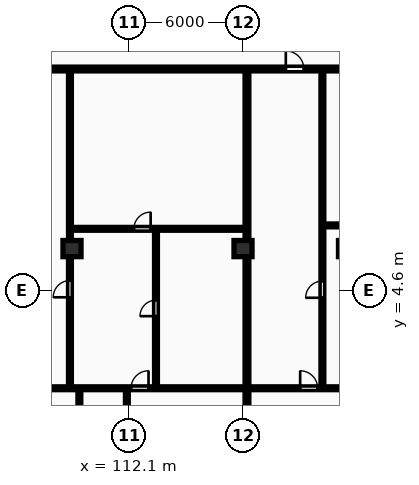
"""IFC4 building model, lengths in metres.
Left out: names, types, materials, properties, quantities, classifications, styles, units other than length and angle.
Written with IfcOpenShell. Run it as: python <this file> out.ifc"""

import sys

from ifc_helpers import new_model, si_unit, direction, frame, frame_2d, origin, origin_2d, place, context, subcontext, project, spatial, rectangle, extrude, element, fill, save


model = new_model("IFC4")
c1 = context("Model", 3, precision=1e-05, world=origin(), true_north=direction((0.0, 1.0)))
c2 = subcontext(c1, "Body", "Model", "MODEL_VIEW")
j1 = project(units=[si_unit("LENGTHUNIT", "METRE"), si_unit("PLANEANGLEUNIT", "RADIAN")], contexts=[c1])
p1 = place(None, origin())
s1 = spatial("IfcSite", under=j1, at=p1, CompositionType="ELEMENT")
p2 = place(p1, origin())
s2 = spatial("IfcBuilding", under=s1, at=p2, CompositionType="ELEMENT")
p3 = place(p2, frame((0.0, 0.0, 24.0)))
s3 = spatial("IfcBuildingStorey", under=s2, at=p3, CompositionType="ELEMENT", Elevation=24.0)
for number, where, z_axis, x_axis in (
    (1, (109.1, 6.8, 0.0), (0.0, 0.0, 1.0), (1.0, 0.0, 0.0)),
    (2, (118.1, 6.8, 0.0), (0.0, 0.0, 1.0), (1.0, 0.0, 0.0)),
    (3, (123.6, 6.8, 0.0), (0.0, 0.0, 1.0), (1.0, 0.0, 0.0)),
):
    element("IfcColumn", number, at=place(p3, frame(where, z_axis=z_axis, x_axis=x_axis)), inside=s3, PredefinedType="COLUMN", context=c2, shape_type="SweptSolid", body=[
        extrude(rectangle(XDim=0.95, YDim=0.85, at=origin_2d()), origin(), (0.0, 0.0, 1.0), 3.25),
    ])
p4 = place(p3, frame((118.307, -10.9, 0.0), z_axis=(0.0, 0.0, 1.0), x_axis=(0.0, 1.0, 0.0)))
e4 = element("IfcWall", 4, at=p4, inside=s3, PredefinedType="PARTITIONING", context=c2, shape_type="SweptSolid", body=[
    extrude(rectangle(XDim=27.07, YDim=0.2, at=frame_2d((13.535, 0.0))), origin(), (0.0, 0.0, 1.0), 2.22),
])
p5 = place(p3, frame((113.519, -0.51, 0.0), z_axis=(0.0, 0.0, 1.0), x_axis=(0.0, 1.0, 0.0)))
e5 = element("IfcWall", 5, at=p5, inside=s3, PredefinedType="PARTITIONING", context=c2, shape_type="SweptSolid", body=[
    extrude(rectangle(XDim=8.35, YDim=0.15, at=frame_2d((4.175, 0.0))), origin(), (0.0, 0.0, 1.0), 2.97),
])
p6 = place(p5, frame((3.755, 0.0, 0.0)))
e6 = element("IfcOpeningElement", 6, at=p6, cuts=e5, PredefinedType="OPENING", context=c2, shape_type="SweptSolid", body=[
    extrude(rectangle(XDim=0.84, YDim=2.04, at=frame_2d((0.42, 1.02))), frame((0.0, 0.085, 0.0), z_axis=(0.0, -1.0, 0.0), x_axis=(1.0, 0.0, 0.0)), (0.0, 0.0, 1.0), 0.17),
])
p7 = place(p3, frame((109.052, 7.84, 0.0), z_axis=(0.0, 0.0, 1.0), x_axis=(1.0, 0.0, 0.0)))
e7 = element("IfcWall", 7, at=p7, inside=s3, PredefinedType="PARTITIONING", context=c2, shape_type="SweptSolid", body=[
    extrude(rectangle(XDim=9.176, YDim=0.15, at=frame_2d((4.588, 0.0))), origin(), (0.0, 0.0, 1.0), 2.97),
])
p8 = place(p7, frame((3.307, 0.0, 0.0)))
e8 = element("IfcOpeningElement", 8, at=p8, cuts=e7, PredefinedType="OPENING", context=c2, shape_type="SweptSolid", body=[
    extrude(rectangle(XDim=0.88, YDim=2.06, at=frame_2d((0.44, 1.03))), frame((0.0, 0.085, 0.0), z_axis=(0.0, -1.0, 0.0), x_axis=(1.0, 0.0, 0.0)), (0.0, 0.0, 1.0), 0.17),
])
p9 = place(p3, frame((108.991, -0.51, 0.0), z_axis=(0.0, 0.0, 1.0), x_axis=(0.0, 1.0, 0.0)))
e9 = element("IfcWall", 9, at=p9, inside=s3, PredefinedType="PARTITIONING", context=c2, shape_type="SweptSolid", body=[
    extrude(rectangle(XDim=16.7, YDim=0.15, at=frame_2d((8.35, 0.0))), origin(), (0.0, 0.0, 1.0), 2.22),
])
p10 = place(p9, frame((4.747, 0.0, 0.0)))
e10 = element("IfcOpeningElement", 10, at=p10, cuts=e9, PredefinedType="OPENING", context=c2, shape_type="SweptSolid", body=[
    extrude(rectangle(XDim=0.88, YDim=2.06, at=frame_2d((0.44, 1.03))), frame((0.0, 0.085, 0.0), z_axis=(0.0, -1.0, 0.0), x_axis=(1.0, 0.0, 0.0)), (0.0, 0.0, 1.0), 0.17),
])
p11 = place(p3, frame((109.487, -5.59, 0.0), z_axis=(0.0, 0.0, 1.0), x_axis=(0.0, 1.0, 0.0)))
e11 = element("IfcWall", 11, at=p11, inside=s3, PredefinedType="PARTITIONING", context=c2, shape_type="SweptSolid", body=[
    extrude(rectangle(XDim=5.0, YDim=0.15, at=frame_2d((2.5, 0.0))), origin(), (0.0, 0.0, 1.0), 2.22),
])
p12 = place(p11, frame((3.049, 0.0, 0.0)))
e12 = element("IfcOpeningElement", 12, at=p12, cuts=e11, PredefinedType="OPENING", context=c2, shape_type="SweptSolid", body=[
    extrude(rectangle(XDim=0.84, YDim=2.04, at=frame_2d((0.42, 1.02))), frame((0.0, 0.085, 0.0), z_axis=(0.0, -1.0, 0.0), x_axis=(1.0, 0.0, 0.0)), (0.0, 0.0, 1.0), 0.17),
])
p13 = place(p3, frame((111.987, -5.59, 0.0), z_axis=(0.0, 0.0, 1.0), x_axis=(0.0, 1.0, 0.0)))
e13 = element("IfcWall", 13, at=p13, inside=s3, PredefinedType="PARTITIONING", context=c2, shape_type="SweptSolid", body=[
    extrude(rectangle(XDim=5.0, YDim=0.15, at=frame_2d((2.5, 0.0))), origin(), (0.0, 0.0, 1.0), 2.97),
])
p14 = place(p13, frame((2.08, 0.0, 0.0)))
e14 = element("IfcOpeningElement", 14, at=p14, cuts=e13, PredefinedType="OPENING", context=c2, shape_type="SweptSolid", body=[
    extrude(rectangle(XDim=0.84, YDim=2.04, at=frame_2d((0.42, 1.02))), frame((0.0, 0.085, 0.0), z_axis=(0.0, -1.0, 0.0), x_axis=(1.0, 0.0, 0.0)), (0.0, 0.0, 1.0), 0.17),
])
p15 = place(p3, frame((105.101, -0.55, 0.0), z_axis=(0.0, 0.0, 1.0), x_axis=(1.0, 0.0, 0.0)))
e15 = element("IfcWall", 15, at=p15, inside=s3, PredefinedType="PARTITIONING", context=c2, shape_type="SweptSolid", body=[
    extrude(rectangle(XDim=13.126, YDim=0.15, at=frame_2d((6.563, 0.0))), origin(), (0.0, 0.0, 1.0), 2.97),
])
p16 = place(p15, frame((7.106, 0.0, 0.0)))
e16 = element("IfcOpeningElement", 16, at=p16, cuts=e15, PredefinedType="OPENING", context=c2, shape_type="SweptSolid", body=[
    extrude(rectangle(XDim=0.92, YDim=2.08, at=frame_2d((0.46, 1.04))), frame((0.0, 0.085, 0.0), z_axis=(0.0, -1.0, 0.0), x_axis=(1.0, 0.0, 0.0)), (0.0, 0.0, 1.0), 0.17),
])
p17 = place(p3, frame((122.337, 8.02, 0.0), z_axis=(0.0, 0.0, 1.0), x_axis=(1.0, 0.0, 0.0)))
e17 = element("IfcWall", 17, at=p17, inside=s3, PredefinedType="PARTITIONING", context=c2, shape_type="SweptSolid", body=[
    extrude(rectangle(XDim=10.283, YDim=0.15, at=frame_2d((5.142, 0.0))), origin(), (0.0, 0.0, 1.0), 2.97),
])
p18 = place(p17, frame((3.99, 0.0, 0.0)))
e18 = element("IfcOpeningElement", 18, at=p18, cuts=e17, PredefinedType="OPENING", context=c2, shape_type="SweptSolid", body=[
    extrude(rectangle(XDim=0.88, YDim=2.06, at=frame_2d((0.44, 1.03))), frame((0.0, 0.085, 0.0), z_axis=(0.0, -1.0, 0.0), x_axis=(1.0, 0.0, 0.0)), (0.0, 0.0, 1.0), 0.17),
])
p19 = place(p3, frame((122.277, -0.51, 0.0), z_axis=(0.0, 0.0, 1.0), x_axis=(0.0, 1.0, 0.0)))
e19 = element("IfcWall", 19, at=p19, inside=s3, PredefinedType="PARTITIONING", context=c2, shape_type="SweptSolid", body=[
    extrude(rectangle(XDim=16.7, YDim=0.15, at=frame_2d((8.35, 0.0))), origin(), (0.0, 0.0, 1.0), 2.97),
])
p20 = place(p19, frame((4.721, 0.0, 0.0)))
e20 = element("IfcOpeningElement", 20, at=p20, cuts=e19, PredefinedType="OPENING", context=c2, shape_type="SweptSolid", body=[
    extrude(rectangle(XDim=0.88, YDim=2.06, at=frame_2d((0.44, 1.03))), frame((0.0, 0.085, 0.0), z_axis=(0.0, -1.0, 0.0), x_axis=(1.0, 0.0, 0.0)), (0.0, 0.0, 1.0), 0.17),
])
p21 = place(p3, frame((118.387, -0.55, 0.0), z_axis=(0.0, 0.0, 1.0), x_axis=(1.0, 0.0, 0.0)))
e21 = element("IfcWall", 21, at=p21, inside=s3, PredefinedType="PARTITIONING", context=c2, shape_type="SweptSolid", body=[
    extrude(rectangle(XDim=14.233, YDim=0.15, at=frame_2d((7.116, 0.0))), origin(), (0.0, 0.0, 1.0), 2.97),
])
p22 = place(p21, frame((2.72, 0.0, 0.0)))
e22 = element("IfcOpeningElement", 22, at=p22, cuts=e21, PredefinedType="OPENING", context=c2, shape_type="SweptSolid", body=[
    extrude(rectangle(XDim=0.92, YDim=2.08, at=frame_2d((0.46, 1.04))), frame((0.0, 0.085, 0.0), z_axis=(0.0, -1.0, 0.0), x_axis=(1.0, 0.0, 0.0)), (0.0, 0.0, 1.0), 0.17),
])
p23 = place(p3, frame((70.7, 16.25, 0.0), z_axis=(0.0, 0.0, 1.0), x_axis=(1.0, 0.0, 0.0)))
e23 = element("IfcWall", 23, at=p23, inside=s3, PredefinedType="PARTITIONING", context=c2, shape_type="SweptSolid", body=[
    extrude(rectangle(XDim=62.0, YDim=0.2, at=frame_2d((31.0, 0.0))), origin(), (0.0, 0.0, 1.0), 2.97),
])
p24 = place(p23, frame((1.186, 0.0, 0.0)))
e24 = element("IfcOpeningElement", 24, at=p24, cuts=e23, PredefinedType="OPENING", context=c2, shape_type="SweptSolid", body=[
    extrude(rectangle(XDim=0.95, YDim=2.15, at=frame_2d((0.475, 1.075))), frame((0.0, 0.11, 0.0), z_axis=(0.0, -1.0, 0.0), x_axis=(1.0, 0.0, 0.0)), (0.0, 0.0, 1.0), 0.22),
])
p25 = place(p23, frame((13.116, 0.0, 0.0)))
e25 = element("IfcOpeningElement", 25, at=p25, cuts=e23, PredefinedType="OPENING", context=c2, shape_type="SweptSolid", body=[
    extrude(rectangle(XDim=0.95, YDim=2.15, at=frame_2d((0.475, 1.075))), frame((0.0, 0.11, 0.0), z_axis=(0.0, -1.0, 0.0), x_axis=(1.0, 0.0, 0.0)), (0.0, 0.0, 1.0), 0.22),
])
p26 = place(p23, frame((25.295, 0.0, 0.0)))
e26 = element("IfcOpeningElement", 26, at=p26, cuts=e23, PredefinedType="OPENING", context=c2, shape_type="SweptSolid", body=[
    extrude(rectangle(XDim=0.95, YDim=2.15, at=frame_2d((0.475, 1.075))), frame((0.0, 0.11, 0.0), z_axis=(0.0, -1.0, 0.0), x_axis=(1.0, 0.0, 0.0)), (0.0, 0.0, 1.0), 0.22),
])
p27 = place(p23, frame((35.747, 0.0, 0.0)))
e27 = element("IfcOpeningElement", 27, at=p27, cuts=e23, PredefinedType="OPENING", context=c2, shape_type="SweptSolid", body=[
    extrude(rectangle(XDim=0.95, YDim=2.15, at=frame_2d((0.475, 1.075))), frame((0.0, 0.11, 0.0), z_axis=(0.0, -1.0, 0.0), x_axis=(1.0, 0.0, 0.0)), (0.0, 0.0, 1.0), 0.22),
])
p28 = place(p23, frame((49.652, 0.0, 0.0)))
e28 = element("IfcOpeningElement", 28, at=p28, cuts=e23, PredefinedType="OPENING", context=c2, shape_type="SweptSolid", body=[
    extrude(rectangle(XDim=0.95, YDim=2.15, at=frame_2d((0.475, 1.075))), frame((0.0, 0.11, 0.0), z_axis=(0.0, -1.0, 0.0), x_axis=(1.0, 0.0, 0.0)), (0.0, 0.0, 1.0), 0.22),
])
p29 = place(p6, origin())
e29 = element("IfcDoor", 29, at=p29, inside=s3, OperationType="SINGLE_SWING_LEFT", PredefinedType="DOOR", context=c2, shape_type="SweptSolid", body=[
    extrude(rectangle(XDim=0.84, YDim=2.04, at=frame_2d((0.42, 1.02))), frame((0.0, 0.025, 0.0), z_axis=(0.0, -1.0, 0.0), x_axis=(1.0, 0.0, 0.0)), (0.0, 0.0, 1.0), 0.05),
])
fill(e6, e29)
p30 = place(p8, origin())
e30 = element("IfcDoor", 30, at=p30, inside=s3, OperationType="SINGLE_SWING_RIGHT", PredefinedType="DOOR", context=c2, shape_type="SweptSolid", body=[
    extrude(rectangle(XDim=0.88, YDim=2.06, at=frame_2d((0.44, 1.03))), frame((0.0, 0.025, 0.0), z_axis=(0.0, -1.0, 0.0), x_axis=(1.0, 0.0, 0.0)), (0.0, 0.0, 1.0), 0.05),
])
fill(e8, e30)
p31 = place(p10, origin())
e31 = element("IfcDoor", 31, at=p31, inside=s3, OperationType="SINGLE_SWING_LEFT", PredefinedType="DOOR", context=c2, shape_type="SweptSolid", body=[
    extrude(rectangle(XDim=0.88, YDim=2.06, at=frame_2d((0.44, 1.03))), frame((0.0, 0.025, 0.0), z_axis=(0.0, -1.0, 0.0), x_axis=(1.0, 0.0, 0.0)), (0.0, 0.0, 1.0), 0.05),
])
fill(e10, e31)
p32 = place(p16, origin())
e32 = element("IfcDoor", 32, at=p32, inside=s3, OperationType="SINGLE_SWING_RIGHT", PredefinedType="DOOR", context=c2, shape_type="SweptSolid", body=[
    extrude(rectangle(XDim=0.92, YDim=2.08, at=frame_2d((0.46, 1.04))), frame((0.0, 0.025, 0.0), z_axis=(0.0, -1.0, 0.0), x_axis=(1.0, 0.0, 0.0)), (0.0, 0.0, 1.0), 0.05),
])
fill(e16, e32)
p33 = place(p20, origin())
e33 = element("IfcDoor", 33, at=p33, inside=s3, OperationType="SINGLE_SWING_LEFT", PredefinedType="DOOR", context=c2, shape_type="SweptSolid", body=[
    extrude(rectangle(XDim=0.88, YDim=2.06, at=frame_2d((0.44, 1.03))), frame((0.0, 0.025, 0.0), z_axis=(0.0, -1.0, 0.0), x_axis=(1.0, 0.0, 0.0)), (0.0, 0.0, 1.0), 0.05),
])
fill(e20, e33)
p34 = place(p22, origin())
e34 = element("IfcDoor", 34, at=p34, inside=s3, OperationType="SINGLE_SWING_LEFT", PredefinedType="DOOR", context=c2, shape_type="SweptSolid", body=[
    extrude(rectangle(XDim=0.92, YDim=2.08, at=frame_2d((0.46, 1.04))), frame((0.0, 0.025, 0.0), z_axis=(0.0, -1.0, 0.0), x_axis=(1.0, 0.0, 0.0)), (0.0, 0.0, 1.0), 0.05),
])
fill(e22, e34)
p35 = place(p28, origin())
e35 = element("IfcDoor", 35, at=p35, inside=s3, OperationType="SINGLE_SWING_LEFT", PredefinedType="DOOR", context=c2, shape_type="SweptSolid", body=[
    extrude(rectangle(XDim=0.95, YDim=2.15, at=frame_2d((0.475, 1.075))), frame((0.0, 0.025, 0.0), z_axis=(0.0, -1.0, 0.0), x_axis=(1.0, 0.0, 0.0)), (0.0, 0.0, 1.0), 0.05),
])
fill(e28, e35)
save(model, sys.argv[1])
